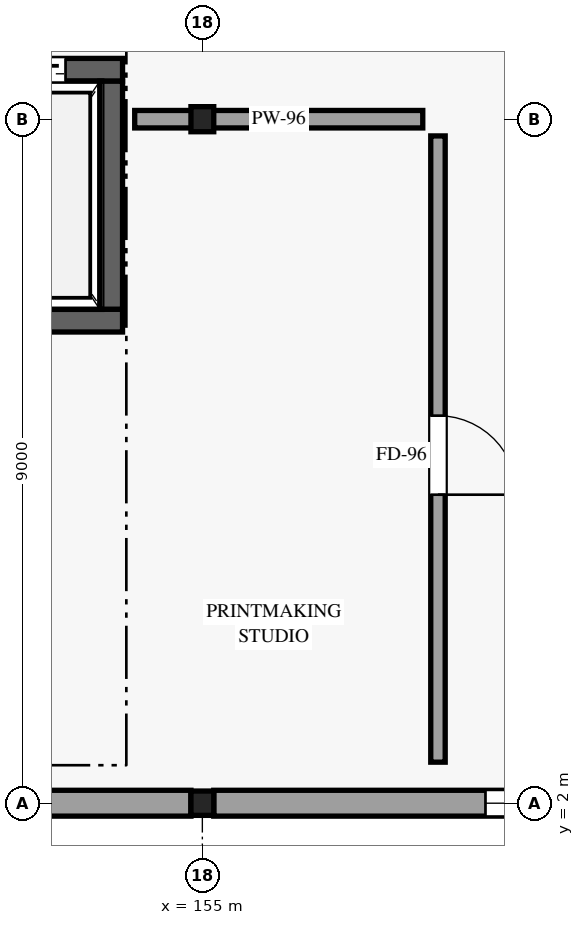
"""IFC4 building model, lengths in metres.
Left out: names, types, materials, properties, quantities, classifications, styles, units other than length and angle.
Written with IfcOpenShell. Run it as: python <this file> out.ifc"""

import sys

from ifc_helpers import new_model, si_unit, direction, frame, frame_2d, origin, origin_2d, place, context, subcontext, project, spatial, rectangle, i_section, extrude, element, fill, save


model = new_model("IFC4")
c1 = context("Model", 3, precision=1e-05, world=origin(), true_north=direction((0.0, 1.0)))
c2 = subcontext(c1, "Body", "Model", "MODEL_VIEW")
j1 = project(units=[si_unit("LENGTHUNIT", "METRE"), si_unit("PLANEANGLEUNIT", "RADIAN")], contexts=[c1])
p1 = place(None, origin())
s1 = spatial("IfcSite", under=j1, at=p1, CompositionType="ELEMENT")
p2 = place(p1, origin())
s2 = spatial("IfcBuilding", under=s1, at=p2, CompositionType="ELEMENT")
p3 = place(p2, frame((0.0, 0.0, 5.4)))
s3 = spatial("IfcBuildingStorey", under=s2, at=p3, CompositionType="ELEMENT", Elevation=5.4)
p4 = place(p3, frame((155.0, 2.0, 0.0), z_axis=(0.0, 0.0, 1.0), x_axis=(1.0, 0.0, 0.0)))
e1 = element("IfcColumn", 1, at=p4, inside=s3, PredefinedType="COLUMN", context=c2, shape_type="SweptSolid", body=[
    extrude(i_section(OverallWidth=0.3, OverallDepth=0.32, WebThickness=0.011, FlangeThickness=0.021, FilletRadius=0.027, at=origin_2d()), origin(), (0.0, 0.0, 1.0), 4.8),
])
p5 = place(p3, frame((155.0, 11.0, 0.0), z_axis=(0.0, 0.0, 1.0), x_axis=(1.0, 0.0, 0.0)))
e2 = element("IfcColumn", 2, at=p5, inside=s3, PredefinedType="COLUMN", context=c2, shape_type="SweptSolid", body=[
    extrude(i_section(OverallWidth=0.3, OverallDepth=0.33, WebThickness=0.01, FlangeThickness=0.017, FilletRadius=0.027, at=origin_2d()), origin(), (0.0, 0.0, 1.0), 4.8),
])
p6 = place(p3, frame((146.15, 2.0, 0.0), z_axis=(0.0, 0.0, 1.0), x_axis=(1.0, 0.0, 0.0)))
e3 = element("IfcWall", 3, at=p6, inside=s3, PredefinedType="STANDARD", context=c2, shape_type="SweptSolid", body=[
    extrude(rectangle(XDim=8.7, YDim=0.34, at=frame_2d((4.35, 0.0))), origin(), (0.0, 0.0, 1.0), 3.985),
])
p7 = place(p6, frame((5.075, 0.0, 0.85), z_axis=(0.0, 0.0, 1.0), x_axis=(-1.0, 0.0, 0.0)))
e4 = element("IfcOpeningElement", 4, at=p7, cuts=e3, PredefinedType="OPENING", context=c2, shape_type="SweptSolid", body=[
    extrude(rectangle(XDim=1.45, YDim=1.85, at=frame_2d((0.725, 0.925))), frame((0.0, 0.18, 0.0), z_axis=(0.0, -1.0, 0.0), x_axis=(1.0, 0.0, 0.0)), (0.0, 0.0, 1.0), 0.36),
])
p8 = place(p3, frame((155.15, 2.0, 0.0), z_axis=(0.0, 0.0, 1.0), x_axis=(1.0, 0.0, 0.0)))
e5 = element("IfcWall", 5, at=p8, inside=s3, PredefinedType="STANDARD", context=c2, shape_type="SweptSolid", body=[
    extrude(rectangle(XDim=8.7, YDim=0.34, at=frame_2d((4.35, 0.0))), origin(), (0.0, 0.0, 1.0), 3.985),
])
p9 = place(p8, frame((5.125, 0.0, 0.85), z_axis=(0.0, 0.0, 1.0), x_axis=(-1.0, 0.0, 0.0)))
e6 = element("IfcOpeningElement", 6, at=p9, cuts=e5, PredefinedType="OPENING", context=c2, shape_type="SweptSolid", body=[
    extrude(rectangle(XDim=1.55, YDim=1.95, at=frame_2d((0.775, 0.975))), frame((0.0, 0.18, 0.0), z_axis=(0.0, -1.0, 0.0), x_axis=(1.0, 0.0, 0.0)), (0.0, 0.0, 1.0), 0.36),
])
p10 = place(p3, frame((151.35, 11.65, 0.0), z_axis=(0.0, 0.0, 1.0), x_axis=(1.0, 0.0, 0.0)))
e7 = element("IfcWall", 7, at=p10, inside=s3, PredefinedType="SHEAR", context=c2, shape_type="SweptSolid", body=[
    extrude(rectangle(XDim=2.6, YDim=0.3, at=frame_2d((1.3, 0.0))), origin(), (0.0, 0.0, 1.0), 4.56),
])
p11 = place(p10, frame((0.75, 0.0, 0.0)))
e8 = element("IfcOpeningElement", 8, at=p11, cuts=e7, PredefinedType="OPENING", context=c2, shape_type="SweptSolid", body=[
    extrude(rectangle(XDim=1.1, YDim=2.2, at=frame_2d((0.55, 1.1))), frame((0.0, 0.16, 0.0), z_axis=(0.0, -1.0, 0.0), x_axis=(1.0, 0.0, 0.0)), (0.0, 0.0, 1.0), 0.32),
])
p12 = place(p3, frame((151.35, 8.35, 0.0), z_axis=(0.0, 0.0, 1.0), x_axis=(1.0, 0.0, 0.0)))
e9 = element("IfcWall", 9, at=p12, inside=s3, PredefinedType="SHEAR", context=c2, shape_type="SweptSolid", body=[
    extrude(rectangle(XDim=2.6, YDim=0.3, at=frame_2d((1.3, 0.0))), origin(), (0.0, 0.0, 1.0), 4.56),
])
p13 = place(p3, frame((153.8, 8.5, 0.0), z_axis=(0.0, 0.0, 1.0), x_axis=(0.0, 1.0, 0.0)))
e10 = element("IfcWall", 10, at=p13, inside=s3, PredefinedType="SHEAR", context=c2, shape_type="SweptSolid", body=[
    extrude(rectangle(XDim=3.0, YDim=0.3, at=frame_2d((1.5, 0.0))), origin(), (0.0, 0.0, 1.0), 4.56),
])
p14 = place(p3, frame((158.1, 2.54, 0.0), z_axis=(0.0, 0.0, 1.0), x_axis=(0.0, 1.0, 0.0)))
e11 = element("IfcWall", 11, at=p14, inside=s3, PredefinedType="PARTITIONING", context=c2, shape_type="SweptSolid", body=[
    extrude(rectangle(XDim=8.24, YDim=0.19, at=frame_2d((4.12, 0.0))), origin(), (0.0, 0.0, 1.0), 3.985),
])
p15 = place(p14, frame((4.559, 0.0, 0.0), z_axis=(0.0, 0.0, 1.0), x_axis=(-1.0, 0.0, 0.0)))
e12 = element("IfcOpeningElement", 12, at=p15, cuts=e11, PredefinedType="OPENING", context=c2, shape_type="SweptSolid", body=[
    extrude(rectangle(XDim=1.04, YDim=2.22, at=frame_2d((0.52, 1.11))), frame((0.0, 0.105, 0.0), z_axis=(0.0, -1.0, 0.0), x_axis=(1.0, 0.0, 0.0)), (0.0, 0.0, 1.0), 0.21),
])
p16 = place(p3, frame((154.11, 11.0, 0.0), z_axis=(0.0, 0.0, 1.0), x_axis=(1.0, 0.0, 0.0)))
e13 = element("IfcWall", 13, at=p16, inside=s3, PredefinedType="PARTITIONING", context=c2, shape_type="SweptSolid", body=[
    extrude(rectangle(XDim=3.79, YDim=0.23, at=frame_2d((1.895, 0.0))), origin(), (0.0, 0.0, 1.0), 3.985),
])
p17 = place(p9, origin())
e14 = element("IfcWindow", 14, at=p17, inside=s3, PartitioningType="SINGLE_PANEL", PredefinedType="WINDOW", context=c2, shape_type="SweptSolid", body=[
    extrude(rectangle(XDim=1.55, YDim=1.95, at=frame_2d((0.775, 0.975))), frame((0.0, 0.03, 0.0), z_axis=(0.0, -1.0, 0.0), x_axis=(1.0, 0.0, 0.0)), (0.0, 0.0, 1.0), 0.06),
])
fill(e6, e14)
p18 = place(p11, origin())
e15 = element("IfcDoor", 15, at=p18, inside=s3, OperationType="SLIDING_TO_LEFT", PredefinedType="DOOR", context=c2, shape_type="SweptSolid", body=[
    extrude(rectangle(XDim=1.1, YDim=2.2, at=frame_2d((0.55, 1.1))), frame((0.0, 0.025, 0.0), z_axis=(0.0, -1.0, 0.0), x_axis=(1.0, 0.0, 0.0)), (0.0, 0.0, 1.0), 0.05),
])
fill(e8, e15)
p19 = place(p15, origin())
e16 = element("IfcDoor", 16, at=p19, inside=s3, OperationType="SINGLE_SWING_RIGHT", PredefinedType="DOOR", context=c2, shape_type="SweptSolid", body=[
    extrude(rectangle(XDim=1.04, YDim=2.22, at=frame_2d((0.52, 1.11))), frame((0.0, 0.025, 0.0), z_axis=(0.0, -1.0, 0.0), x_axis=(1.0, 0.0, 0.0)), (0.0, 0.0, 1.0), 0.05),
])
fill(e12, e16)
save(model, sys.argv[1])
